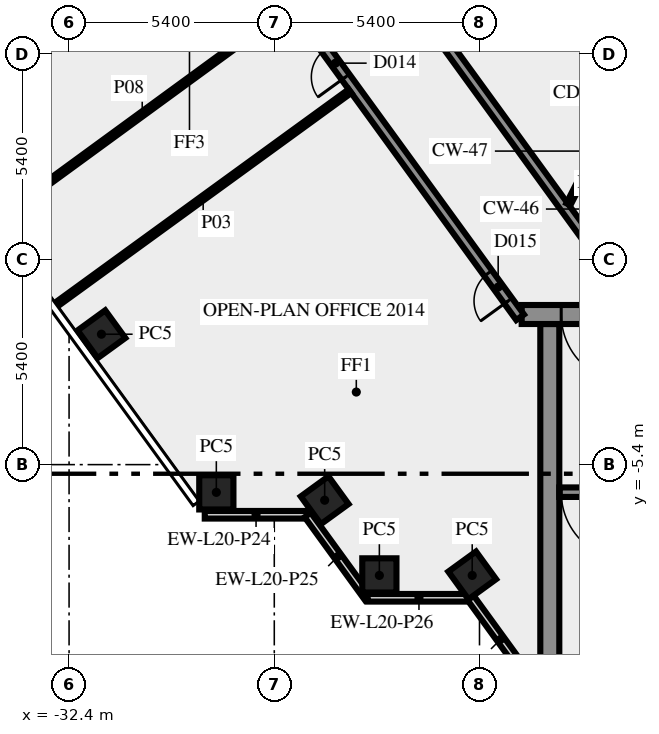
"""IFC4 building model, lengths in metres.
Left out: names, types, materials, properties, quantities, classifications, styles, units other than length and angle.
Written with IfcOpenShell. Run it as: python <this file> out.ifc"""

import sys

from ifc_helpers import new_model, si_unit, direction, frame, frame_2d, origin, origin_2d, place, context, subcontext, project, spatial, rectangle, extrude, element, fill, save


model = new_model("IFC4")
c1 = context("Model", 3, precision=1e-05, world=origin(), true_north=direction((0.0, 1.0)))
c2 = subcontext(c1, "Body", "Model", "MODEL_VIEW")
j1 = project(units=[si_unit("LENGTHUNIT", "METRE"), si_unit("PLANEANGLEUNIT", "RADIAN")], contexts=[c1])
p1 = place(None, origin())
s1 = spatial("IfcSite", under=j1, at=p1, CompositionType="ELEMENT")
p2 = place(p1, origin())
s2 = spatial("IfcBuilding", under=s1, at=p2, CompositionType="ELEMENT")
p3 = place(p2, frame((0.0, 0.0, 89.0)))
s3 = spatial("IfcBuildingStorey", under=s2, at=p3, CompositionType="ELEMENT", Elevation=89.0)
for number, where, z_axis, x_axis in (
    (1, (-31.548, -1.969, 0.0), (0.0, 0.0, 1.0), (0.588, -0.809, 0.0)),
    (2, (-28.525, -6.13, 0.0), (0.0, 0.0, 1.0), (1.0, 0.0, 0.0)),
    (3, (-25.674, -6.337, 0.0), (0.0, 0.0, 1.0), (0.588, -0.809, 0.0)),
    (4, (-24.235, -8.315, 0.0), (0.0, 0.0, 1.0), (1.0, 0.0, 0.0)),
    (5, (-21.792, -8.315, 0.0), (0.0, 0.0, 1.0), (0.588, -0.809, 0.0)),
):
    element("IfcColumn", number, at=place(p3, frame(where, z_axis=z_axis, x_axis=x_axis)), inside=s3, PredefinedType="COLUMN", context=c2, shape_type="SweptSolid", body=[
        extrude(rectangle(XDim=0.9, YDim=0.9, at=origin_2d()), origin(), (0.0, 0.0, 1.0), 3.65),
    ])
p4 = place(p3, frame((-28.83, -6.719, 0.0), z_axis=(0.0, 0.0, 1.0), x_axis=(1.0, 0.0, 0.0)))
e6 = element("IfcWall", 6, at=p4, inside=s3, PredefinedType="SOLIDWALL", context=c2, shape_type="SweptSolid", body=[
    extrude(rectangle(XDim=2.7, YDim=0.2, at=frame_2d((1.35, 0.0))), origin(), (0.0, 0.0, 1.0), 3.65),
])
p5 = place(p3, frame((-26.12, -6.724, 0.0), z_axis=(0.0, 0.0, 1.0), x_axis=(0.587720002413, -0.809064397168, 0.0)))
e7 = element("IfcWall", 7, at=p5, inside=s3, PredefinedType="SOLIDWALL", context=c2, shape_type="SweptSolid", body=[
    extrude(rectangle(XDim=2.7, YDim=0.2, at=frame_2d((1.35, 0.0))), origin(), (0.0, 0.0, 1.0), 3.65),
])
p6 = place(p3, frame((-24.543, -8.904, 0.0), z_axis=(0.0, 0.0, 1.0), x_axis=(1.0, 0.0, 0.0)))
e8 = element("IfcWall", 8, at=p6, inside=s3, PredefinedType="SOLIDWALL", context=c2, shape_type="SweptSolid", body=[
    extrude(rectangle(XDim=2.7, YDim=0.2, at=frame_2d((1.35, 0.0))), origin(), (0.0, 0.0, 1.0), 3.65),
])
p7 = place(p3, frame((-21.833, -8.909, 0.0), z_axis=(0.0, 0.0, 1.0), x_axis=(0.587766567315, -0.809030569476, 0.0)))
e9 = element("IfcWall", 9, at=p7, inside=s3, PredefinedType="SOLIDWALL", context=c2, shape_type="SweptSolid", body=[
    extrude(rectangle(XDim=2.688, YDim=0.2, at=frame_2d((1.344, 0.0))), origin(), (0.0, 0.0, 1.0), 3.65),
])
p8 = place(p3, frame((-19.75, -10.5, 0.0), z_axis=(0.0, 0.0, 1.0), x_axis=(0.0, 1.0, 0.0)))
e10 = element("IfcWall", 10, at=p8, inside=s3, PredefinedType="SHEAR", context=c2, shape_type="SweptSolid", body=[
    extrude(rectangle(XDim=8.8, YDim=0.5, at=frame_2d((4.4, 0.0))), origin(), (0.0, 0.0, 1.0), 3.65),
])
p9 = place(p3, frame((-11.45, -6.125, 0.0), z_axis=(0.0, 0.0, 1.0), x_axis=(-1.0, 0.0, 0.0)))
e11 = element("IfcWall", 11, at=p9, inside=s3, PredefinedType="SHEAR", context=c2, shape_type="SweptSolid", body=[
    extrude(rectangle(XDim=8.05, YDim=0.25, at=frame_2d((4.025, 0.0))), origin(), (0.0, 0.0, 1.0), 3.65),
])
p10 = place(p9, frame((6.2, 0.0, 0.0)))
e12 = element("IfcOpeningElement", 12, at=p10, cuts=e11, PredefinedType="OPENING", context=c2, shape_type="SweptSolid", body=[
    extrude(rectangle(XDim=1.8, YDim=2.1, at=frame_2d((0.9, 1.05))), frame((0.0, 0.135, 0.0), z_axis=(0.0, -1.0, 0.0), x_axis=(1.0, 0.0, 0.0)), (0.0, 0.0, 1.0), 0.27),
])
p11 = place(p3, frame((20.49, -1.45, 0.0), z_axis=(0.0, 0.0, 1.0), x_axis=(-1.0, 0.0, 0.0)))
e13 = element("IfcWall", 13, at=p11, inside=s3, PredefinedType="SHEAR", context=c2, shape_type="SweptSolid", body=[
    extrude(rectangle(XDim=40.98, YDim=0.5, at=frame_2d((20.49, 0.0))), origin(), (0.0, 0.0, 1.0), 3.65),
])
p12 = place(p11, frame((38.14, 0.0, 0.0)))
e14 = element("IfcOpeningElement", 14, at=p12, cuts=e13, PredefinedType="OPENING", context=c2, shape_type="SweptSolid", body=[
    extrude(rectangle(XDim=1.8, YDim=2.1, at=frame_2d((0.9, 1.05))), frame((0.0, 0.26, 0.0), z_axis=(0.0, -1.0, 0.0), x_axis=(1.0, 0.0, 0.0)), (0.0, 0.0, 1.0), 0.52),
])
p13 = place(p11, frame((35.89, 0.0, 0.0)))
e15 = element("IfcOpeningElement", 15, at=p13, cuts=e13, PredefinedType="OPENING", context=c2, shape_type="SweptSolid", body=[
    extrude(rectangle(XDim=0.9, YDim=2.1, at=frame_2d((0.45, 1.05))), frame((0.0, 0.26, 0.0), z_axis=(0.0, -1.0, 0.0), x_axis=(1.0, 0.0, 0.0)), (0.0, 0.0, 1.0), 0.52),
])
p14 = place(p11, frame((32.94, 0.0, 0.0)))
e16 = element("IfcOpeningElement", 16, at=p14, cuts=e13, PredefinedType="OPENING", context=c2, shape_type="SweptSolid", body=[
    extrude(rectangle(XDim=0.9, YDim=2.1, at=frame_2d((0.45, 1.05))), frame((0.0, 0.26, 0.0), z_axis=(0.0, -1.0, 0.0), x_axis=(1.0, 0.0, 0.0)), (0.0, 0.0, 1.0), 0.52),
])
p15 = place(p11, frame((21.765, 0.0, 0.0)))
e17 = element("IfcOpeningElement", 17, at=p15, cuts=e13, PredefinedType="OPENING", context=c2, shape_type="SweptSolid", body=[
    extrude(rectangle(XDim=2.0, YDim=2.1, at=frame_2d((1.0, 1.05))), frame((0.0, 0.26, 0.0), z_axis=(0.0, -1.0, 0.0), x_axis=(1.0, 0.0, 0.0)), (0.0, 0.0, 1.0), 0.52),
])
p16 = place(p11, frame((7.14, 0.0, 0.0)))
e18 = element("IfcOpeningElement", 18, at=p16, cuts=e13, PredefinedType="OPENING", context=c2, shape_type="SweptSolid", body=[
    extrude(rectangle(XDim=0.9, YDim=2.1, at=frame_2d((0.45, 1.05))), frame((0.0, 0.26, 0.0), z_axis=(0.0, -1.0, 0.0), x_axis=(1.0, 0.0, 0.0)), (0.0, 0.0, 1.0), 0.52),
])
p17 = place(p11, frame((5.028, 0.0, 0.0)))
e19 = element("IfcOpeningElement", 19, at=p17, cuts=e13, PredefinedType="OPENING", context=c2, shape_type="SweptSolid", body=[
    extrude(rectangle(XDim=0.8, YDim=2.1, at=frame_2d((0.4, 1.05))), frame((0.0, 0.26, 0.0), z_axis=(0.0, -1.0, 0.0), x_axis=(1.0, 0.0, 0.0)), (0.0, 0.0, 1.0), 0.52),
])
p18 = place(p11, frame((3.452, 0.0, 0.0)))
e20 = element("IfcOpeningElement", 20, at=p18, cuts=e13, PredefinedType="OPENING", context=c2, shape_type="SweptSolid", body=[
    extrude(rectangle(XDim=0.8, YDim=2.1, at=frame_2d((0.4, 1.05))), frame((0.0, 0.26, 0.0), z_axis=(0.0, -1.0, 0.0), x_axis=(1.0, 0.0, 0.0)), (0.0, 0.0, 1.0), 0.52),
])
p19 = place(p11, frame((1.04, 0.0, 0.0)))
e21 = element("IfcOpeningElement", 21, at=p19, cuts=e13, PredefinedType="OPENING", context=c2, shape_type="SweptSolid", body=[
    extrude(rectangle(XDim=1.8, YDim=2.1, at=frame_2d((0.9, 1.05))), frame((0.0, 0.26, 0.0), z_axis=(0.0, -1.0, 0.0), x_axis=(1.0, 0.0, 0.0)), (0.0, 0.0, 1.0), 0.52),
])
p20 = place(p3, frame((-20.531, -1.523, 0.0), z_axis=(0.0, 0.0, 1.0), x_axis=(-0.587784522481, 0.809017524614, 0.0)))
e22 = element("IfcWall", 22, at=p20, inside=s3, PredefinedType="SOLIDWALL", context=c2, shape_type="SweptSolid", body=[
    extrude(rectangle(XDim=49.912, YDim=0.25, at=frame_2d((24.956, 0.0))), origin(), (0.0, 0.0, 1.0), 3.65),
])
p21 = place(p20, frame((0.533, 0.0, 0.0)))
e23 = element("IfcOpeningElement", 23, at=p21, cuts=e22, PredefinedType="OPENING", context=c2, shape_type="SweptSolid", body=[
    extrude(rectangle(XDim=0.9, YDim=2.1, at=frame_2d((0.45, 1.05))), frame((0.0, 0.135, 0.0), z_axis=(0.0, -1.0, 0.0), x_axis=(1.0, 0.0, 0.0)), (0.0, 0.0, 1.0), 0.27),
])
p22 = place(p20, frame((48.47, 0.0, 0.0)))
e24 = element("IfcOpeningElement", 24, at=p22, cuts=e22, PredefinedType="OPENING", context=c2, shape_type="SweptSolid", body=[
    extrude(rectangle(XDim=1.0, YDim=2.1, at=frame_2d((0.5, 1.05))), frame((0.0, 0.135, 0.0), z_axis=(0.0, -1.0, 0.0), x_axis=(1.0, 0.0, 0.0)), (0.0, 0.0, 1.0), 0.27),
])
p23 = place(p20, frame((17.365, 0.0, 0.0)))
e25 = element("IfcOpeningElement", 25, at=p23, cuts=e22, PredefinedType="OPENING", context=c2, shape_type="SweptSolid", body=[
    extrude(rectangle(XDim=1.8, YDim=2.1, at=frame_2d((0.9, 1.05))), frame((0.0, 0.135, 0.0), z_axis=(0.0, -1.0, 0.0), x_axis=(1.0, 0.0, 0.0)), (0.0, 0.0, 1.0), 0.27),
])
p24 = place(p20, frame((7.816, 0.0, 0.0)))
e26 = element("IfcOpeningElement", 26, at=p24, cuts=e22, PredefinedType="OPENING", context=c2, shape_type="SweptSolid", body=[
    extrude(rectangle(XDim=0.9, YDim=2.1, at=frame_2d((0.45, 1.05))), frame((0.0, 0.135, 0.0), z_axis=(0.0, -1.0, 0.0), x_axis=(1.0, 0.0, 0.0)), (0.0, 0.0, 1.0), 0.27),
])
p25 = place(p3, frame((-37.232, 25.972, 0.0), z_axis=(0.0, 0.0, 1.0), x_axis=(0.587786323093, -0.809016216391, 0.0)))
e27 = element("IfcWall", 27, at=p25, inside=s3, PredefinedType="SOLIDWALL", context=c2, shape_type="SweptSolid", body=[
    extrude(rectangle(XDim=33.493, YDim=0.25, at=frame_2d((16.747, 0.0))), origin(), (0.0, 0.0, 1.0), 3.65),
])
p26 = place(p25, frame((19.135, 0.0, 0.0)))
e28 = element("IfcOpeningElement", 28, at=p26, cuts=e27, PredefinedType="OPENING", context=c2, shape_type="SweptSolid", body=[
    extrude(rectangle(XDim=0.9, YDim=2.1, at=frame_2d((0.45, 1.05))), frame((0.0, 0.135, 0.0), z_axis=(0.0, -1.0, 0.0), x_axis=(1.0, 0.0, 0.0)), (0.0, 0.0, 1.0), 0.27),
])
p27 = place(p25, frame((7.137, 0.0, 0.0)))
e29 = element("IfcOpeningElement", 29, at=p27, cuts=e27, PredefinedType="OPENING", context=c2, shape_type="SweptSolid", body=[
    extrude(rectangle(XDim=1.8, YDim=2.1, at=frame_2d((0.9, 1.05))), frame((0.0, 0.135, 0.0), z_axis=(0.0, -1.0, 0.0), x_axis=(1.0, 0.0, 0.0)), (0.0, 0.0, 1.0), 0.27),
])
p28 = place(p25, frame((16.435, 0.0, 0.0)))
e30 = element("IfcOpeningElement", 30, at=p28, cuts=e27, PredefinedType="OPENING", context=c2, shape_type="SweptSolid", body=[
    extrude(rectangle(XDim=0.9, YDim=2.1, at=frame_2d((0.45, 1.05))), frame((0.0, 0.135, 0.0), z_axis=(0.0, -1.0, 0.0), x_axis=(1.0, 0.0, 0.0)), (0.0, 0.0, 1.0), 0.27),
])
p29 = place(p3, frame((-25.008, 4.427, 0.0), z_axis=(0.0, 0.0, 1.0), x_axis=(-0.808994684961, -0.587815957341, 0.0)))
e31 = element("IfcWall", 31, at=p29, inside=s3, PredefinedType="PARTITIONING", context=c2, shape_type="SweptSolid", body=[
    extrude(rectangle(XDim=9.55, YDim=0.12, at=frame_2d((4.775, 0.0))), origin(), (0.0, 0.0, 1.0), 2.75),
])
p30 = place(p3, frame((-34.332, 1.011, 0.0), z_axis=(0.0, 0.0, 1.0), x_axis=(0.807594822539, 0.589737740532, 0.0)))
e32 = element("IfcWall", 32, at=p30, inside=s3, PredefinedType="PARTITIONING", context=c2, shape_type="SweptSolid", body=[
    extrude(rectangle(XDim=9.55, YDim=0.12, at=frame_2d((4.775, 0.0))), origin(), (0.0, 0.0, 1.0), 2.75),
])
p31 = place(p3, frame((-19.261, 1.45, 0.0), z_axis=(0.0, 0.0, 1.0), x_axis=(0.453950796792, 0.891026752736, 0.0)))
e33 = element("IfcWall", 33, at=p31, inside=s3, PredefinedType="PARTITIONING", context=c2, shape_type="SweptSolid", body=[
    extrude(rectangle(XDim=2.778, YDim=0.12, at=frame_2d((1.389, 0.0))), origin(), (0.0, 0.0, 1.0), 3.65),
])
p32 = place(p10, origin())
e34 = element("IfcDoor", 34, at=p32, inside=s3, OperationType="DOUBLE_DOOR_SINGLE_SWING", PredefinedType="DOOR", context=c2, shape_type="SweptSolid", body=[
    extrude(rectangle(XDim=1.8, YDim=2.1, at=frame_2d((0.9, 1.05))), frame((0.0, 0.025, 0.0), z_axis=(0.0, -1.0, 0.0), x_axis=(1.0, 0.0, 0.0)), (0.0, 0.0, 1.0), 0.05),
])
fill(e12, e34)
p33 = place(p12, origin())
e35 = element("IfcDoor", 35, at=p33, inside=s3, OperationType="DOUBLE_DOOR_SINGLE_SWING", PredefinedType="DOOR", context=c2, shape_type="SweptSolid", body=[
    extrude(rectangle(XDim=1.8, YDim=2.1, at=frame_2d((0.9, 1.05))), frame((0.0, 0.025, 0.0), z_axis=(0.0, -1.0, 0.0), x_axis=(1.0, 0.0, 0.0)), (0.0, 0.0, 1.0), 0.05),
])
fill(e14, e35)
p34 = place(p21, origin())
e36 = element("IfcDoor", 36, at=p34, inside=s3, OperationType="SINGLE_SWING_LEFT", PredefinedType="DOOR", context=c2, shape_type="SweptSolid", body=[
    extrude(rectangle(XDim=0.9, YDim=2.1, at=frame_2d((0.45, 1.05))), frame((0.0, 0.025, 0.0), z_axis=(0.0, -1.0, 0.0), x_axis=(1.0, 0.0, 0.0)), (0.0, 0.0, 1.0), 0.05),
])
fill(e23, e36)
p35 = place(p24, origin())
e37 = element("IfcDoor", 37, at=p35, inside=s3, OperationType="SINGLE_SWING_LEFT", PredefinedType="DOOR", context=c2, shape_type="SweptSolid", body=[
    extrude(rectangle(XDim=0.9, YDim=2.1, at=frame_2d((0.45, 1.05))), frame((0.0, 0.025, 0.0), z_axis=(0.0, -1.0, 0.0), x_axis=(1.0, 0.0, 0.0)), (0.0, 0.0, 1.0), 0.05),
])
fill(e26, e37)
save(model, sys.argv[1])
